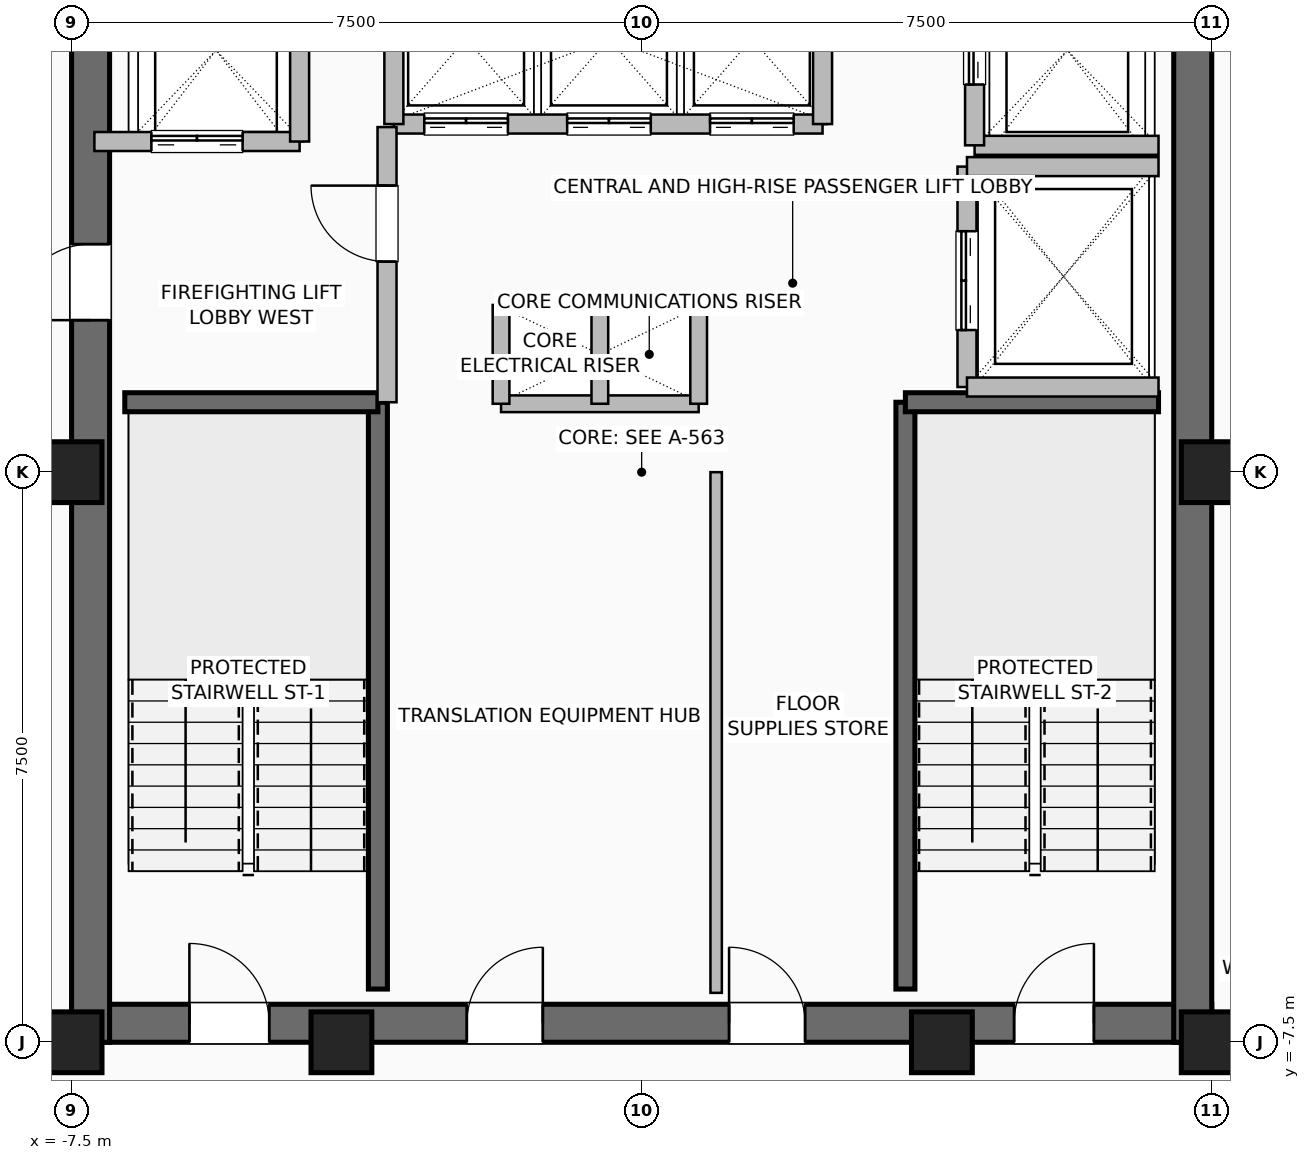
"""IFC4 building model, lengths in metres.
Left out: names, types, materials, properties, quantities, classifications, styles, units other than length and angle.
Written with IfcOpenShell. Run it as: python <this file> out.ifc"""

import sys

from ifc_helpers import new_model, si_unit, direction, frame, frame_2d, origin, origin_2d, place, context, subcontext, project, spatial, rectangle, hollow_rectangle, extrude, element, fill, save


model = new_model("IFC4")
c1 = context("Model", 3, precision=1e-05, world=origin(), true_north=direction((0.0, 1.0)))
c2 = subcontext(c1, "Body", "Model", "MODEL_VIEW")
j1 = project(units=[si_unit("LENGTHUNIT", "METRE"), si_unit("PLANEANGLEUNIT", "RADIAN")], contexts=[c1])
p1 = place(None, origin())
s1 = spatial("IfcSite", under=j1, at=p1, CompositionType="ELEMENT")
p2 = place(p1, origin())
s2 = spatial("IfcBuilding", under=s1, at=p2, CompositionType="ELEMENT")
p3 = place(p2, frame((0.0, 0.0, 254.0)))
s3 = spatial("IfcBuildingStorey", under=s2, at=p3, CompositionType="ELEMENT", Elevation=254.0)
for number, where, z_axis, x_axis in (
    (1, (-7.5, -7.5, 0.0), (0.0, 0.0, 1.0), (1.0, 0.0, 0.0)),
    (2, (-3.95, -7.5, 0.0), (0.0, 0.0, 1.0), (1.0, 0.0, 0.0)),
    (3, (3.95, -7.5, 0.0), (0.0, 0.0, 1.0), (1.0, 0.0, 0.0)),
    (4, (7.5, -7.5, 0.0), (0.0, 0.0, 1.0), (1.0, 0.0, 0.0)),
    (5, (7.5, 0.0, 0.0), (0.0, 0.0, 1.0), (1.0, 0.0, 0.0)),
    (6, (-7.5, 0.0, 0.0), (0.0, 0.0, 1.0), (1.0, 0.0, 0.0)),
):
    element("IfcColumn", number, at=place(p3, frame(where, z_axis=z_axis, x_axis=x_axis)), inside=s3, PredefinedType="COLUMN", context=c2, shape_type="SweptSolid", body=[
        extrude(hollow_rectangle(XDim=0.8, YDim=0.8, WallThickness=0.04, at=origin_2d()), origin(), (0.0, 0.0, 1.0), 3.6),
    ])
p4 = place(p3, frame((-7.5, -7.25, 0.0), z_axis=(0.0, 0.0, 1.0), x_axis=(1.0, 0.0, 0.0)))
e7 = element("IfcWall", 7, at=p4, inside=s3, PredefinedType="SHEAR", context=c2, shape_type="SweptSolid", body=[
    extrude(rectangle(XDim=15.0, YDim=0.5, at=frame_2d((7.5, 0.0))), origin(), (0.0, 0.0, 1.0), 3.36),
])
p5 = place(p4, frame((1.55, 0.0, 0.0)))
e8 = element("IfcOpeningElement", 8, at=p5, cuts=e7, PredefinedType="OPENING", context=c2, shape_type="SweptSolid", body=[
    extrude(rectangle(XDim=1.05, YDim=2.08, at=frame_2d((0.525, 1.04))), frame((0.0, 0.26, 0.0), z_axis=(0.0, -1.0, 0.0), x_axis=(1.0, 0.0, 0.0)), (0.0, 0.0, 1.0), 0.52),
])
p6 = place(p4, frame((12.4, 0.0, 0.0)))
e9 = element("IfcOpeningElement", 9, at=p6, cuts=e7, PredefinedType="OPENING", context=c2, shape_type="SweptSolid", body=[
    extrude(rectangle(XDim=1.05, YDim=2.08, at=frame_2d((0.525, 1.04))), frame((0.0, 0.26, 0.0), z_axis=(0.0, -1.0, 0.0), x_axis=(1.0, 0.0, 0.0)), (0.0, 0.0, 1.0), 0.52),
])
p7 = place(p4, frame((5.2, 0.0, 0.0)))
e10 = element("IfcOpeningElement", 10, at=p7, cuts=e7, PredefinedType="OPENING", context=c2, shape_type="SweptSolid", body=[
    extrude(rectangle(XDim=1.0, YDim=2.08, at=frame_2d((0.5, 1.04))), frame((0.0, 0.26, 0.0), z_axis=(0.0, -1.0, 0.0), x_axis=(1.0, 0.0, 0.0)), (0.0, 0.0, 1.0), 0.52),
])
p8 = place(p4, frame((8.65, 0.0, 0.0)))
e11 = element("IfcOpeningElement", 11, at=p8, cuts=e7, PredefinedType="OPENING", context=c2, shape_type="SweptSolid", body=[
    extrude(rectangle(XDim=1.0, YDim=2.08, at=frame_2d((0.5, 1.04))), frame((0.0, 0.26, 0.0), z_axis=(0.0, -1.0, 0.0), x_axis=(1.0, 0.0, 0.0)), (0.0, 0.0, 1.0), 0.52),
])
p9 = place(p3, frame((-7.25, -7.5, 0.0), z_axis=(0.0, 0.0, 1.0), x_axis=(0.0, 1.0, 0.0)))
e12 = element("IfcWall", 12, at=p9, inside=s3, PredefinedType="SHEAR", context=c2, shape_type="SweptSolid", body=[
    extrude(rectangle(XDim=15.0, YDim=0.5, at=frame_2d((7.5, 0.0))), origin(), (0.0, 0.0, 1.0), 3.36),
])
p10 = place(p9, frame((9.5, 0.0, 0.0)))
e13 = element("IfcOpeningElement", 13, at=p10, cuts=e12, PredefinedType="OPENING", context=c2, shape_type="SweptSolid", body=[
    extrude(rectangle(XDim=1.0, YDim=2.08, at=frame_2d((0.5, 1.04))), frame((0.0, 0.26, 0.0), z_axis=(0.0, -1.0, 0.0), x_axis=(1.0, 0.0, 0.0)), (0.0, 0.0, 1.0), 0.52),
])
p11 = place(p3, frame((7.25, -7.5, 0.0), z_axis=(0.0, 0.0, 1.0), x_axis=(0.0, 1.0, 0.0)))
e14 = element("IfcWall", 14, at=p11, inside=s3, PredefinedType="SHEAR", context=c2, shape_type="SweptSolid", body=[
    extrude(rectangle(XDim=15.0, YDim=0.5, at=frame_2d((7.5, 0.0))), origin(), (0.0, 0.0, 1.0), 3.36),
])
p12 = place(p3, frame((-3.47, -6.8, 0.0), z_axis=(0.0, 0.0, 1.0), x_axis=(0.0, 1.0, 0.0)))
e15 = element("IfcWall", 15, at=p12, inside=s3, PredefinedType="SHEAR", context=c2, shape_type="SweptSolid", body=[
    extrude(rectangle(XDim=7.72, YDim=0.25, at=frame_2d((3.86, 0.0))), origin(), (0.0, 0.0, 1.0), 3.36),
])
p13 = place(p3, frame((-6.8, 0.92, 0.0), z_axis=(0.0, 0.0, 1.0), x_axis=(1.0, 0.0, 0.0)))
e16 = element("IfcWall", 16, at=p13, inside=s3, PredefinedType="SHEAR", context=c2, shape_type="SweptSolid", body=[
    extrude(rectangle(XDim=3.33, YDim=0.25, at=frame_2d((1.665, 0.0))), origin(), (0.0, 0.0, 1.0), 3.36),
])
p14 = place(p3, frame((3.47, -6.8, 0.0), z_axis=(0.0, 0.0, 1.0), x_axis=(0.0, 1.0, 0.0)))
e17 = element("IfcWall", 17, at=p14, inside=s3, PredefinedType="SHEAR", context=c2, shape_type="SweptSolid", body=[
    extrude(rectangle(XDim=7.72, YDim=0.25, at=frame_2d((3.86, 0.0))), origin(), (0.0, 0.0, 1.0), 3.36),
])
p15 = place(p3, frame((3.47, 0.92, 0.0), z_axis=(0.0, 0.0, 1.0), x_axis=(1.0, 0.0, 0.0)))
e18 = element("IfcWall", 18, at=p15, inside=s3, PredefinedType="SHEAR", context=c2, shape_type="SweptSolid", body=[
    extrude(rectangle(XDim=3.33, YDim=0.25, at=frame_2d((1.665, 0.0))), origin(), (0.0, 0.0, 1.0), 3.36),
])
for number, where, z_axis, x_axis in (
    (19, (-1.85, 2.2, 0.0), (0.0, 0.0, 1.0), (1.0, 0.0, 0.0)),
    (20, (-1.85, 0.9, 0.0), (0.0, 0.0, 1.0), (1.0, 0.0, 0.0)),
):
    element("IfcWall", number, at=place(p3, frame(where, z_axis=z_axis, x_axis=x_axis)), inside=s3, PredefinedType="PARTITIONING", context=c2, shape_type="SweptSolid", body=[
        extrude(rectangle(XDim=2.6, YDim=0.22, at=frame_2d((1.3, 0.0))), origin(), (0.0, 0.0, 1.0), 3.36),
    ])
for number, where, z_axis, x_axis in (
    (21, (-0.55, 0.9, 0.0), (0.0, 0.0, 1.0), (0.0, 1.0, 0.0)),
    (22, (0.75, 0.9, 0.0), (0.0, 0.0, 1.0), (0.0, 1.0, 0.0)),
    (23, (-1.85, 0.9, 0.0), (0.0, 0.0, 1.0), (0.0, 1.0, 0.0)),
):
    element("IfcWall", number, at=place(p3, frame(where, z_axis=z_axis, x_axis=x_axis)), inside=s3, PredefinedType="PARTITIONING", context=c2, shape_type="SweptSolid", body=[
        extrude(rectangle(XDim=1.3, YDim=0.22, at=frame_2d((0.65, 0.0))), origin(), (0.0, 0.0, 1.0), 3.36),
    ])
p16 = place(p3, frame((-3.26, 4.58, 0.0), z_axis=(0.0, 0.0, 1.0), x_axis=(1.0, 0.0, 0.0)))
e24 = element("IfcWall", 24, at=p16, inside=s3, PredefinedType="SHEAR", context=c2, shape_type="SweptSolid", body=[
    extrude(rectangle(XDim=5.64, YDim=0.25, at=frame_2d((2.82, 0.0))), origin(), (0.0, 0.0, 1.0), 3.36),
])
p17 = place(p16, frame((0.4, 0.0, 0.0)))
e25 = element("IfcOpeningElement", 25, at=p17, cuts=e24, PredefinedType="OPENING", context=c2, shape_type="SweptSolid", body=[
    extrude(rectangle(XDim=1.1, YDim=2.2, at=frame_2d((0.55, 1.1))), frame((0.0, 0.135, 0.0), z_axis=(0.0, -1.0, 0.0), x_axis=(1.0, 0.0, 0.0)), (0.0, 0.0, 1.0), 0.27),
])
p18 = place(p16, frame((2.28, 0.0, 0.0)))
e26 = element("IfcOpeningElement", 26, at=p18, cuts=e24, PredefinedType="OPENING", context=c2, shape_type="SweptSolid", body=[
    extrude(rectangle(XDim=1.1, YDim=2.2, at=frame_2d((0.55, 1.1))), frame((0.0, 0.135, 0.0), z_axis=(0.0, -1.0, 0.0), x_axis=(1.0, 0.0, 0.0)), (0.0, 0.0, 1.0), 0.27),
])
p19 = place(p16, frame((4.16, 0.0, 0.0)))
e27 = element("IfcOpeningElement", 27, at=p19, cuts=e24, PredefinedType="OPENING", context=c2, shape_type="SweptSolid", body=[
    extrude(rectangle(XDim=1.1, YDim=2.2, at=frame_2d((0.55, 1.1))), frame((0.0, 0.135, 0.0), z_axis=(0.0, -1.0, 0.0), x_axis=(1.0, 0.0, 0.0)), (0.0, 0.0, 1.0), 0.27),
])
for number, where, z_axis, x_axis in (
    (28, (-3.26, 4.58, 0.0), (0.0, 0.0, 1.0), (0.0, 1.0, 0.0)),
    (29, (2.38, 4.58, 0.0), (0.0, 0.0, 1.0), (0.0, 1.0, 0.0)),
):
    element("IfcWall", number, at=place(p3, frame(where, z_axis=z_axis, x_axis=x_axis)), inside=s3, PredefinedType="SHEAR", context=c2, shape_type="SweptSolid", body=[
        extrude(rectangle(XDim=2.22, YDim=0.25, at=frame_2d((1.11, 0.0))), origin(), (0.0, 0.0, 1.0), 3.36),
    ])
p20 = place(p3, frame((-7.2, 4.35, 0.0), z_axis=(0.0, 0.0, 1.0), x_axis=(1.0, 0.0, 0.0)))
e30 = element("IfcWall", 30, at=p20, inside=s3, PredefinedType="SHEAR", context=c2, shape_type="SweptSolid", body=[
    extrude(rectangle(XDim=2.7, YDim=0.25, at=frame_2d((1.35, 0.0))), origin(), (0.0, 0.0, 1.0), 3.36),
])
p21 = place(p20, frame((0.75, 0.0, 0.0)))
e31 = element("IfcOpeningElement", 31, at=p21, cuts=e30, PredefinedType="OPENING", context=c2, shape_type="SweptSolid", body=[
    extrude(rectangle(XDim=1.2, YDim=2.2, at=frame_2d((0.6, 1.1))), frame((0.0, 0.135, 0.0), z_axis=(0.0, -1.0, 0.0), x_axis=(1.0, 0.0, 0.0)), (0.0, 0.0, 1.0), 0.27),
])
p22 = place(p3, frame((-4.5, 4.35, 0.0), z_axis=(0.0, 0.0, 1.0), x_axis=(0.0, 1.0, 0.0)))
e32 = element("IfcWall", 32, at=p22, inside=s3, PredefinedType="SHEAR", context=c2, shape_type="SweptSolid", body=[
    extrude(rectangle(XDim=2.85, YDim=0.25, at=frame_2d((1.425, 0.0))), origin(), (0.0, 0.0, 1.0), 3.36),
])
p23 = place(p3, frame((4.38, 4.3, 0.0), z_axis=(0.0, 0.0, 1.0), x_axis=(1.0, 0.0, 0.0)))
e33 = element("IfcWall", 33, at=p23, inside=s3, PredefinedType="SHEAR", context=c2, shape_type="SweptSolid", body=[
    extrude(rectangle(XDim=2.42, YDim=0.25, at=frame_2d((1.21, 0.0))), origin(), (0.0, 0.0, 1.0), 3.36),
])
p24 = place(p3, frame((4.38, 4.3, 0.0), z_axis=(0.0, 0.0, 1.0), x_axis=(0.0, 1.0, 0.0)))
e34 = element("IfcWall", 34, at=p24, inside=s3, PredefinedType="SHEAR", context=c2, shape_type="SweptSolid", body=[
    extrude(rectangle(XDim=2.5, YDim=0.25, at=frame_2d((1.25, 0.0))), origin(), (0.0, 0.0, 1.0), 3.36),
])
p25 = place(p24, frame((0.8, 0.0, 0.0)))
e35 = element("IfcOpeningElement", 35, at=p25, cuts=e34, PredefinedType="OPENING", context=c2, shape_type="SweptSolid", body=[
    extrude(rectangle(XDim=1.2, YDim=2.2, at=frame_2d((0.6, 1.1))), frame((0.0, 0.135, 0.0), z_axis=(0.0, -1.0, 0.0), x_axis=(1.0, 0.0, 0.0)), (0.0, 0.0, 1.0), 0.27),
])
p26 = place(p3, frame((4.28, 1.12, 0.0), z_axis=(0.0, 0.0, 1.0), x_axis=(0.0, 1.0, 0.0)))
e36 = element("IfcWall", 36, at=p26, inside=s3, PredefinedType="SHEAR", context=c2, shape_type="SweptSolid", body=[
    extrude(rectangle(XDim=2.9, YDim=0.25, at=frame_2d((1.45, 0.0))), origin(), (0.0, 0.0, 1.0), 3.36),
])
p27 = place(p26, frame((0.75, 0.0, 0.0)))
e37 = element("IfcOpeningElement", 37, at=p27, cuts=e36, PredefinedType="OPENING", context=c2, shape_type="SweptSolid", body=[
    extrude(rectangle(XDim=1.3, YDim=2.3, at=frame_2d((0.65, 1.15))), frame((0.0, 0.135, 0.0), z_axis=(0.0, -1.0, 0.0), x_axis=(1.0, 0.0, 0.0)), (0.0, 0.0, 1.0), 0.27),
])
for number, where, z_axis, x_axis in (
    (38, (4.28, 1.12, 0.0), (0.0, 0.0, 1.0), (1.0, 0.0, 0.0)),
    (39, (4.28, 4.02, 0.0), (0.0, 0.0, 1.0), (1.0, 0.0, 0.0)),
):
    element("IfcWall", number, at=place(p3, frame(where, z_axis=z_axis, x_axis=x_axis)), inside=s3, PredefinedType="SHEAR", context=c2, shape_type="SweptSolid", body=[
        extrude(rectangle(XDim=2.52, YDim=0.25, at=frame_2d((1.26, 0.0))), origin(), (0.0, 0.0, 1.0), 3.36),
    ])
p28 = place(p3, frame((-3.35, 0.92, 0.0), z_axis=(0.0, 0.0, 1.0), x_axis=(0.0, 1.0, 0.0)))
e40 = element("IfcWall", 40, at=p28, inside=s3, PredefinedType="SHEAR", context=c2, shape_type="SweptSolid", body=[
    extrude(rectangle(XDim=3.62, YDim=0.25, at=frame_2d((1.81, 0.0))), origin(), (0.0, 0.0, 1.0), 3.36),
])
p29 = place(p28, frame((1.85, 0.0, 0.0)))
e41 = element("IfcOpeningElement", 41, at=p29, cuts=e40, PredefinedType="OPENING", context=c2, shape_type="SweptSolid", body=[
    extrude(rectangle(XDim=1.0, YDim=2.08, at=frame_2d((0.5, 1.04))), frame((0.0, 0.135, 0.0), z_axis=(0.0, -1.0, 0.0), x_axis=(1.0, 0.0, 0.0)), (0.0, 0.0, 1.0), 0.27),
])
p30 = place(p3, frame((0.98, -6.85, 0.0), z_axis=(0.0, 0.0, 1.0), x_axis=(0.0, 1.0, 0.0)))
e42 = element("IfcWall", 42, at=p30, inside=s3, PredefinedType="PARTITIONING", context=c2, shape_type="SweptSolid", body=[
    extrude(rectangle(XDim=6.85, YDim=0.15, at=frame_2d((3.425, 0.0))), origin(), (0.0, 0.0, 1.0), 3.36),
])
p31 = place(p3, frame((7.45, -7.48, 0.0), z_axis=(0.0, 0.0, 1.0), x_axis=(1.0, 0.0, 0.0)))
e43 = element("IfcWall", 43, at=p31, inside=s3, PredefinedType="PARTITIONING", context=c2, shape_type="SweptSolid", body=[
    extrude(rectangle(XDim=0.95, YDim=0.15, at=frame_2d((0.475, 0.0))), origin(), (0.0, 0.0, 1.0), 3.36),
])
p32 = place(p5, origin())
e44 = element("IfcDoor", 44, at=p32, inside=s3, OperationType="SINGLE_SWING_LEFT", PredefinedType="DOOR", context=c2, shape_type="SweptSolid", body=[
    extrude(rectangle(XDim=1.05, YDim=2.08, at=frame_2d((0.525, 1.04))), frame((0.0, 0.025, 0.0), z_axis=(0.0, -1.0, 0.0), x_axis=(1.0, 0.0, 0.0)), (0.0, 0.0, 1.0), 0.05),
])
fill(e8, e44)
p33 = place(p6, origin())
e45 = element("IfcDoor", 45, at=p33, inside=s3, OperationType="SINGLE_SWING_RIGHT", PredefinedType="DOOR", context=c2, shape_type="SweptSolid", body=[
    extrude(rectangle(XDim=1.05, YDim=2.08, at=frame_2d((0.525, 1.04))), frame((0.0, 0.025, 0.0), z_axis=(0.0, -1.0, 0.0), x_axis=(1.0, 0.0, 0.0)), (0.0, 0.0, 1.0), 0.05),
])
fill(e9, e45)
p34 = place(p10, origin())
e46 = element("IfcDoor", 46, at=p34, inside=s3, OperationType="SINGLE_SWING_LEFT", PredefinedType="DOOR", context=c2, shape_type="SweptSolid", body=[
    extrude(rectangle(XDim=1.0, YDim=2.08, at=frame_2d((0.5, 1.04))), frame((0.0, 0.025, 0.0), z_axis=(0.0, -1.0, 0.0), x_axis=(1.0, 0.0, 0.0)), (0.0, 0.0, 1.0), 0.05),
])
fill(e13, e46)
p35 = place(p7, origin())
e47 = element("IfcDoor", 47, at=p35, inside=s3, OperationType="SINGLE_SWING_RIGHT", PredefinedType="DOOR", context=c2, shape_type="SweptSolid", body=[
    extrude(rectangle(XDim=1.0, YDim=2.08, at=frame_2d((0.5, 1.04))), frame((0.0, 0.025, 0.0), z_axis=(0.0, -1.0, 0.0), x_axis=(1.0, 0.0, 0.0)), (0.0, 0.0, 1.0), 0.05),
])
fill(e10, e47)
p36 = place(p8, origin())
e48 = element("IfcDoor", 48, at=p36, inside=s3, OperationType="SINGLE_SWING_LEFT", PredefinedType="DOOR", context=c2, shape_type="SweptSolid", body=[
    extrude(rectangle(XDim=1.0, YDim=2.08, at=frame_2d((0.5, 1.04))), frame((0.0, 0.025, 0.0), z_axis=(0.0, -1.0, 0.0), x_axis=(1.0, 0.0, 0.0)), (0.0, 0.0, 1.0), 0.05),
])
fill(e11, e48)
p37 = place(p17, origin())
e49 = element("IfcDoor", 49, at=p37, inside=s3, OperationType="DOUBLE_DOOR_SLIDING", PredefinedType="DOOR", context=c2, shape_type="SweptSolid", body=[
    extrude(rectangle(XDim=1.1, YDim=2.2, at=frame_2d((0.55, 1.1))), frame((0.0, 0.025, 0.0), z_axis=(0.0, -1.0, 0.0), x_axis=(1.0, 0.0, 0.0)), (0.0, 0.0, 1.0), 0.05),
])
fill(e25, e49)
p38 = place(p18, origin())
e50 = element("IfcDoor", 50, at=p38, inside=s3, OperationType="DOUBLE_DOOR_SLIDING", PredefinedType="DOOR", context=c2, shape_type="SweptSolid", body=[
    extrude(rectangle(XDim=1.1, YDim=2.2, at=frame_2d((0.55, 1.1))), frame((0.0, 0.025, 0.0), z_axis=(0.0, -1.0, 0.0), x_axis=(1.0, 0.0, 0.0)), (0.0, 0.0, 1.0), 0.05),
])
fill(e26, e50)
p39 = place(p19, origin())
e51 = element("IfcDoor", 51, at=p39, inside=s3, OperationType="DOUBLE_DOOR_SLIDING", PredefinedType="DOOR", context=c2, shape_type="SweptSolid", body=[
    extrude(rectangle(XDim=1.1, YDim=2.2, at=frame_2d((0.55, 1.1))), frame((0.0, 0.025, 0.0), z_axis=(0.0, -1.0, 0.0), x_axis=(1.0, 0.0, 0.0)), (0.0, 0.0, 1.0), 0.05),
])
fill(e27, e51)
p40 = place(p21, origin())
e52 = element("IfcDoor", 52, at=p40, inside=s3, OperationType="DOUBLE_DOOR_SLIDING", PredefinedType="DOOR", context=c2, shape_type="SweptSolid", body=[
    extrude(rectangle(XDim=1.2, YDim=2.2, at=frame_2d((0.6, 1.1))), frame((0.0, 0.025, 0.0), z_axis=(0.0, -1.0, 0.0), x_axis=(1.0, 0.0, 0.0)), (0.0, 0.0, 1.0), 0.05),
])
fill(e31, e52)
p41 = place(p25, origin())
e53 = element("IfcDoor", 53, at=p41, inside=s3, OperationType="DOUBLE_DOOR_SLIDING", PredefinedType="DOOR", context=c2, shape_type="SweptSolid", body=[
    extrude(rectangle(XDim=1.2, YDim=2.2, at=frame_2d((0.6, 1.1))), frame((0.0, 0.025, 0.0), z_axis=(0.0, -1.0, 0.0), x_axis=(1.0, 0.0, 0.0)), (0.0, 0.0, 1.0), 0.05),
])
fill(e35, e53)
p42 = place(p27, origin())
e54 = element("IfcDoor", 54, at=p42, inside=s3, OperationType="DOUBLE_DOOR_SLIDING", PredefinedType="DOOR", context=c2, shape_type="SweptSolid", body=[
    extrude(rectangle(XDim=1.3, YDim=2.3, at=frame_2d((0.65, 1.15))), frame((0.0, 0.025, 0.0), z_axis=(0.0, -1.0, 0.0), x_axis=(1.0, 0.0, 0.0)), (0.0, 0.0, 1.0), 0.05),
])
fill(e37, e54)
p43 = place(p29, origin())
e55 = element("IfcDoor", 55, at=p43, inside=s3, OperationType="SINGLE_SWING_RIGHT", PredefinedType="DOOR", context=c2, shape_type="SweptSolid", body=[
    extrude(rectangle(XDim=1.0, YDim=2.08, at=frame_2d((0.5, 1.04))), frame((0.0, 0.025, 0.0), z_axis=(0.0, -1.0, 0.0), x_axis=(1.0, 0.0, 0.0)), (0.0, 0.0, 1.0), 0.05),
])
fill(e41, e55)
save(model, sys.argv[1])
